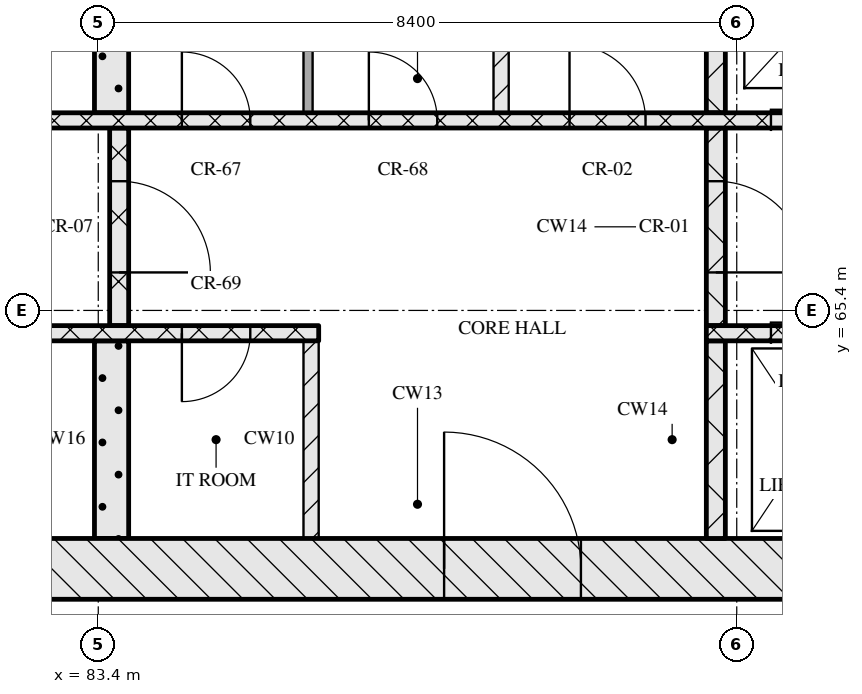
"""IFC4 building model, lengths in metres.
Left out: names, types, materials, properties, quantities, classifications, styles, units other than length and angle.
Written with IfcOpenShell. Run it as: python <this file> out.ifc"""

import sys

from ifc_helpers import new_model, si_unit, direction, frame, frame_2d, origin, place, context, subcontext, project, spatial, rectangle, extrude, element, fill, save


model = new_model("IFC4")
c1 = context("Model", 3, precision=1e-05, world=origin(), true_north=direction((0.0, 1.0)))
c2 = subcontext(c1, "Body", "Model", "MODEL_VIEW")
j1 = project(units=[si_unit("LENGTHUNIT", "METRE"), si_unit("PLANEANGLEUNIT", "RADIAN")], contexts=[c1])
p1 = place(None, origin())
s1 = spatial("IfcSite", under=j1, at=p1, CompositionType="ELEMENT")
p2 = place(p1, origin())
s2 = spatial("IfcBuilding", under=s1, at=p2, CompositionType="ELEMENT")
p3 = place(p2, frame((0.0, 0.0, 151.05)))
s3 = spatial("IfcBuildingStorey", under=s2, at=p3, CompositionType="ELEMENT", Elevation=151.05)
p4 = place(p3, frame((67.0, 62.0, 0.0), z_axis=(0.0, 0.0, 1.0), x_axis=(1.0, 0.0, 0.0)))
e1 = element("IfcWall", 1, at=p4, inside=s3, PredefinedType="SOLIDWALL", context=c2, shape_type="SweptSolid", body=[
    extrude(rectangle(XDim=41.2, YDim=0.8, at=frame_2d((20.6, 0.0))), origin(), (0.0, 0.0, 1.0), 3.32),
])
p5 = place(p4, frame((20.95, 0.0, 0.0)))
e2 = element("IfcOpeningElement", 2, at=p5, cuts=e1, PredefinedType="OPENING", context=c2, shape_type="SweptSolid", body=[
    extrude(rectangle(XDim=1.8, YDim=2.1, at=frame_2d((0.9, 1.05))), frame((0.0, 0.41, 0.0), z_axis=(0.0, -1.0, 0.0), x_axis=(1.0, 0.0, 0.0)), (0.0, 0.0, 1.0), 0.82),
])
p6 = place(p3, frame((83.575, 62.4, 0.0), z_axis=(0.0, 0.0, 1.0), x_axis=(0.0, 1.0, 0.0)))
e3 = element("IfcWall", 3, at=p6, inside=s3, PredefinedType="SOLIDWALL", context=c2, shape_type="SweptSolid", body=[
    extrude(rectangle(XDim=2.6, YDim=0.45, at=frame_2d((1.3, 0.0))), origin(), (0.0, 0.0, 1.0), 3.32),
])
p7 = place(p3, frame((86.2, 62.4, 0.0), z_axis=(0.0, 0.0, 1.0), x_axis=(0.0, 1.0, 0.0)))
e4 = element("IfcWall", 4, at=p7, inside=s3, PredefinedType="PARTITIONING", context=c2, shape_type="SweptSolid", body=[
    extrude(rectangle(XDim=2.6, YDim=0.2, at=frame_2d((1.3, 0.0))), origin(), (0.0, 0.0, 1.0), 3.32),
])
p8 = place(p3, frame((91.525, 62.4, 0.0), z_axis=(0.0, 0.0, 1.0), x_axis=(0.0, 1.0, 0.0)))
e5 = element("IfcWall", 5, at=p8, inside=s3, PredefinedType="SOLIDWALL", context=c2, shape_type="SweptSolid", body=[
    extrude(rectangle(XDim=2.6, YDim=0.25, at=frame_2d((1.3, 0.0))), origin(), (0.0, 0.0, 1.0), 3.32),
])
p9 = place(p3, frame((67.8, 65.1, 0.0), z_axis=(0.0, 0.0, 1.0), x_axis=(1.0, 0.0, 0.0)))
e6 = element("IfcWall", 6, at=p9, inside=s3, PredefinedType="SOLIDWALL", context=c2, shape_type="SweptSolid", body=[
    extrude(rectangle(XDim=18.5, YDim=0.2, at=frame_2d((9.25, 0.0))), origin(), (0.0, 0.0, 1.0), 3.32),
])
p10 = place(p9, frame((7.27, 0.0, 0.0)))
e7 = element("IfcOpeningElement", 7, at=p10, cuts=e6, PredefinedType="OPENING", context=c2, shape_type="SweptSolid", body=[
    extrude(rectangle(XDim=0.9, YDim=2.1, at=frame_2d((0.45, 1.05))), frame((0.0, 0.11, 0.0), z_axis=(0.0, -1.0, 0.0), x_axis=(1.0, 0.0, 0.0)), (0.0, 0.0, 1.0), 0.22),
])
p11 = place(p9, frame((11.45, 0.0, 0.0)))
e8 = element("IfcOpeningElement", 8, at=p11, cuts=e6, PredefinedType="OPENING", context=c2, shape_type="SweptSolid", body=[
    extrude(rectangle(XDim=0.9, YDim=2.1, at=frame_2d((0.45, 1.05))), frame((0.0, 0.11, 0.0), z_axis=(0.0, -1.0, 0.0), x_axis=(1.0, 0.0, 0.0)), (0.0, 0.0, 1.0), 0.22),
])
p12 = place(p9, frame((16.7, 0.0, 0.0)))
e9 = element("IfcOpeningElement", 9, at=p12, cuts=e6, PredefinedType="OPENING", context=c2, shape_type="SweptSolid", body=[
    extrude(rectangle(XDim=0.9, YDim=2.1, at=frame_2d((0.45, 1.05))), frame((0.0, 0.11, 0.0), z_axis=(0.0, -1.0, 0.0), x_axis=(1.0, 0.0, 0.0)), (0.0, 0.0, 1.0), 0.22),
])
p13 = place(p3, frame((91.4, 65.1, 0.0), z_axis=(0.0, 0.0, 1.0), x_axis=(1.0, 0.0, 0.0)))
e10 = element("IfcWall", 10, at=p13, inside=s3, PredefinedType="SOLIDWALL", context=c2, shape_type="SweptSolid", body=[
    extrude(rectangle(XDim=16.0, YDim=0.2, at=frame_2d((8.0, 0.0))), origin(), (0.0, 0.0, 1.0), 3.32),
])
p14 = place(p13, frame((0.85, 0.0, 0.0)))
e11 = element("IfcOpeningElement", 11, at=p14, cuts=e10, PredefinedType="OPENING", context=c2, shape_type="SweptSolid", body=[
    extrude(rectangle(XDim=1.1, YDim=2.1, at=frame_2d((0.55, 1.05))), frame((0.0, 0.11, 0.0), z_axis=(0.0, -1.0, 0.0), x_axis=(1.0, 0.0, 0.0)), (0.0, 0.0, 1.0), 0.22),
])
p15 = place(p13, frame((3.35, 0.0, 0.0)))
e12 = element("IfcOpeningElement", 12, at=p15, cuts=e10, PredefinedType="OPENING", context=c2, shape_type="SweptSolid", body=[
    extrude(rectangle(XDim=1.1, YDim=2.1, at=frame_2d((0.55, 1.05))), frame((0.0, 0.11, 0.0), z_axis=(0.0, -1.0, 0.0), x_axis=(1.0, 0.0, 0.0)), (0.0, 0.0, 1.0), 0.22),
])
p16 = place(p13, frame((5.85, 0.0, 0.0)))
e13 = element("IfcOpeningElement", 13, at=p16, cuts=e10, PredefinedType="OPENING", context=c2, shape_type="SweptSolid", body=[
    extrude(rectangle(XDim=1.1, YDim=2.1, at=frame_2d((0.55, 1.05))), frame((0.0, 0.11, 0.0), z_axis=(0.0, -1.0, 0.0), x_axis=(1.0, 0.0, 0.0)), (0.0, 0.0, 1.0), 0.22),
])
p17 = place(p13, frame((7.83, 0.0, 0.0)))
e14 = element("IfcOpeningElement", 14, at=p17, cuts=e10, PredefinedType="OPENING", context=c2, shape_type="SweptSolid", body=[
    extrude(rectangle(XDim=0.9, YDim=2.1, at=frame_2d((0.45, 1.05))), frame((0.0, 0.11, 0.0), z_axis=(0.0, -1.0, 0.0), x_axis=(1.0, 0.0, 0.0)), (0.0, 0.0, 1.0), 0.22),
])
p18 = place(p3, frame((83.675, 65.2, 0.0), z_axis=(0.0, 0.0, 1.0), x_axis=(0.0, 1.0, 0.0)))
e15 = element("IfcWall", 15, at=p18, inside=s3, PredefinedType="SOLIDWALL", context=c2, shape_type="SweptSolid", body=[
    extrude(rectangle(XDim=2.6, YDim=0.25, at=frame_2d((1.3, 0.0))), origin(), (0.0, 0.0, 1.0), 3.32),
])
p19 = place(p18, frame((0.7, 0.0, 0.0)))
e16 = element("IfcOpeningElement", 16, at=p19, cuts=e15, PredefinedType="OPENING", context=c2, shape_type="SweptSolid", body=[
    extrude(rectangle(XDim=1.2, YDim=2.1, at=frame_2d((0.6, 1.05))), frame((0.0, 0.135, 0.0), z_axis=(0.0, -1.0, 0.0), x_axis=(1.0, 0.0, 0.0)), (0.0, 0.0, 1.0), 0.27),
])
p20 = place(p3, frame((91.525, 65.2, 0.0), z_axis=(0.0, 0.0, 1.0), x_axis=(0.0, 1.0, 0.0)))
e17 = element("IfcWall", 17, at=p20, inside=s3, PredefinedType="SOLIDWALL", context=c2, shape_type="SweptSolid", body=[
    extrude(rectangle(XDim=2.6, YDim=0.25, at=frame_2d((1.3, 0.0))), origin(), (0.0, 0.0, 1.0), 3.32),
])
p21 = place(p20, frame((0.7, 0.0, 0.0)))
e18 = element("IfcOpeningElement", 18, at=p21, cuts=e17, PredefinedType="OPENING", context=c2, shape_type="SweptSolid", body=[
    extrude(rectangle(XDim=1.2, YDim=2.1, at=frame_2d((0.6, 1.05))), frame((0.0, 0.135, 0.0), z_axis=(0.0, -1.0, 0.0), x_axis=(1.0, 0.0, 0.0)), (0.0, 0.0, 1.0), 0.27),
])
p22 = place(p3, frame((76.05, 67.9, 0.0), z_axis=(0.0, 0.0, 1.0), x_axis=(1.0, 0.0, 0.0)))
e19 = element("IfcWall", 19, at=p22, inside=s3, PredefinedType="SOLIDWALL", context=c2, shape_type="SweptSolid", body=[
    extrude(rectangle(XDim=23.1, YDim=0.2, at=frame_2d((11.55, 0.0))), origin(), (0.0, 0.0, 1.0), 3.32),
])
p23 = place(p22, frame((1.4, 0.0, 0.0)))
e20 = element("IfcOpeningElement", 20, at=p23, cuts=e19, PredefinedType="OPENING", context=c2, shape_type="SweptSolid", body=[
    extrude(rectangle(XDim=0.9, YDim=2.1, at=frame_2d((0.45, 1.05))), frame((0.0, 0.11, 0.0), z_axis=(0.0, -1.0, 0.0), x_axis=(1.0, 0.0, 0.0)), (0.0, 0.0, 1.0), 0.22),
])
p24 = place(p22, frame((5.11, 0.0, 0.0)))
e21 = element("IfcOpeningElement", 21, at=p24, cuts=e19, PredefinedType="OPENING", context=c2, shape_type="SweptSolid", body=[
    extrude(rectangle(XDim=0.9, YDim=2.1, at=frame_2d((0.45, 1.05))), frame((0.0, 0.11, 0.0), z_axis=(0.0, -1.0, 0.0), x_axis=(1.0, 0.0, 0.0)), (0.0, 0.0, 1.0), 0.22),
])
p25 = place(p22, frame((8.45, 0.0, 0.0)))
e22 = element("IfcOpeningElement", 22, at=p25, cuts=e19, PredefinedType="OPENING", context=c2, shape_type="SweptSolid", body=[
    extrude(rectangle(XDim=0.9, YDim=2.1, at=frame_2d((0.45, 1.05))), frame((0.0, 0.11, 0.0), z_axis=(0.0, -1.0, 0.0), x_axis=(1.0, 0.0, 0.0)), (0.0, 0.0, 1.0), 0.22),
])
p26 = place(p22, frame((10.91, 0.0, 0.0)))
e23 = element("IfcOpeningElement", 23, at=p26, cuts=e19, PredefinedType="OPENING", context=c2, shape_type="SweptSolid", body=[
    extrude(rectangle(XDim=0.9, YDim=2.1, at=frame_2d((0.45, 1.05))), frame((0.0, 0.11, 0.0), z_axis=(0.0, -1.0, 0.0), x_axis=(1.0, 0.0, 0.0)), (0.0, 0.0, 1.0), 0.22),
])
p27 = place(p22, frame((13.55, 0.0, 0.0)))
e24 = element("IfcOpeningElement", 24, at=p27, cuts=e19, PredefinedType="OPENING", context=c2, shape_type="SweptSolid", body=[
    extrude(rectangle(XDim=1.0, YDim=2.1, at=frame_2d((0.5, 1.05))), frame((0.0, 0.11, 0.0), z_axis=(0.0, -1.0, 0.0), x_axis=(1.0, 0.0, 0.0)), (0.0, 0.0, 1.0), 0.22),
])
p28 = place(p22, frame((16.2, 0.0, 0.0)))
e25 = element("IfcOpeningElement", 25, at=p28, cuts=e19, PredefinedType="OPENING", context=c2, shape_type="SweptSolid", body=[
    extrude(rectangle(XDim=1.1, YDim=2.1, at=frame_2d((0.55, 1.05))), frame((0.0, 0.11, 0.0), z_axis=(0.0, -1.0, 0.0), x_axis=(1.0, 0.0, 0.0)), (0.0, 0.0, 1.0), 0.22),
])
p29 = place(p22, frame((18.7, 0.0, 0.0)))
e26 = element("IfcOpeningElement", 26, at=p29, cuts=e19, PredefinedType="OPENING", context=c2, shape_type="SweptSolid", body=[
    extrude(rectangle(XDim=1.1, YDim=2.1, at=frame_2d((0.55, 1.05))), frame((0.0, 0.11, 0.0), z_axis=(0.0, -1.0, 0.0), x_axis=(1.0, 0.0, 0.0)), (0.0, 0.0, 1.0), 0.22),
])
p30 = place(p22, frame((21.2, 0.0, 0.0)))
e27 = element("IfcOpeningElement", 27, at=p30, cuts=e19, PredefinedType="OPENING", context=c2, shape_type="SweptSolid", body=[
    extrude(rectangle(XDim=1.1, YDim=2.1, at=frame_2d((0.55, 1.05))), frame((0.0, 0.11, 0.0), z_axis=(0.0, -1.0, 0.0), x_axis=(1.0, 0.0, 0.0)), (0.0, 0.0, 1.0), 0.22),
])
p31 = place(p3, frame((83.575, 68.0, 0.0), z_axis=(0.0, 0.0, 1.0), x_axis=(0.0, 1.0, 0.0)))
e28 = element("IfcWall", 28, at=p31, inside=s3, PredefinedType="SOLIDWALL", context=c2, shape_type="SweptSolid", body=[
    extrude(rectangle(XDim=2.6, YDim=0.45, at=frame_2d((1.3, 0.0))), origin(), (0.0, 0.0, 1.0), 3.32),
])
p32 = place(p3, frame((86.16, 68.0, 0.0), z_axis=(0.0, 0.0, 1.0), x_axis=(0.0, 1.0, 0.0)))
e29 = element("IfcWall", 29, at=p32, inside=s3, PredefinedType="PARTITIONING", context=c2, shape_type="SweptSolid", body=[
    extrude(rectangle(XDim=2.6, YDim=0.12, at=frame_2d((1.3, 0.0))), origin(), (0.0, 0.0, 1.0), 3.32),
])
p33 = place(p3, frame((88.7, 68.0, 0.0), z_axis=(0.0, 0.0, 1.0), x_axis=(0.0, 1.0, 0.0)))
e30 = element("IfcWall", 30, at=p33, inside=s3, PredefinedType="PARTITIONING", context=c2, shape_type="SweptSolid", body=[
    extrude(rectangle(XDim=2.6, YDim=0.2, at=frame_2d((1.3, 0.0))), origin(), (0.0, 0.0, 1.0), 3.32),
])
p34 = place(p3, frame((91.525, 68.0, 0.0), z_axis=(0.0, 0.0, 1.0), x_axis=(0.0, 1.0, 0.0)))
e31 = element("IfcWall", 31, at=p34, inside=s3, PredefinedType="SOLIDWALL", context=c2, shape_type="SweptSolid", body=[
    extrude(rectangle(XDim=2.6, YDim=0.25, at=frame_2d((1.3, 0.0))), origin(), (0.0, 0.0, 1.0), 3.32),
])
p35 = place(p5, origin())
e32 = element("IfcDoor", 32, at=p35, inside=s3, OperationType="DOUBLE_DOOR_SINGLE_SWING", PredefinedType="DOOR", context=c2, shape_type="SweptSolid", body=[
    extrude(rectangle(XDim=1.8, YDim=2.1, at=frame_2d((0.9, 1.05))), frame((0.0, 0.025, 0.0), z_axis=(0.0, -1.0, 0.0), x_axis=(1.0, 0.0, 0.0)), (0.0, 0.0, 1.0), 0.05),
])
fill(e2, e32)
p36 = place(p12, origin())
e33 = element("IfcDoor", 33, at=p36, inside=s3, OperationType="SINGLE_SWING_RIGHT", PredefinedType="DOOR", context=c2, shape_type="SweptSolid", body=[
    extrude(rectangle(XDim=0.9, YDim=2.1, at=frame_2d((0.45, 1.05))), frame((0.0, 0.025, 0.0), z_axis=(0.0, -1.0, 0.0), x_axis=(1.0, 0.0, 0.0)), (0.0, 0.0, 1.0), 0.05),
])
fill(e9, e33)
p37 = place(p14, origin())
e34 = element("IfcDoor", 34, at=p37, inside=s3, OperationType="SLIDING_TO_LEFT", PredefinedType="DOOR", context=c2, shape_type="SweptSolid", body=[
    extrude(rectangle(XDim=1.1, YDim=2.1, at=frame_2d((0.55, 1.05))), frame((0.0, 0.025, 0.0), z_axis=(0.0, -1.0, 0.0), x_axis=(1.0, 0.0, 0.0)), (0.0, 0.0, 1.0), 0.05),
])
fill(e11, e34)
p38 = place(p19, origin())
e35 = element("IfcDoor", 35, at=p38, inside=s3, OperationType="SINGLE_SWING_RIGHT", PredefinedType="DOOR", context=c2, shape_type="SweptSolid", body=[
    extrude(rectangle(XDim=1.2, YDim=2.1, at=frame_2d((0.6, 1.05))), frame((0.0, 0.025, 0.0), z_axis=(0.0, -1.0, 0.0), x_axis=(1.0, 0.0, 0.0)), (0.0, 0.0, 1.0), 0.05),
])
fill(e16, e35)
p39 = place(p21, origin())
e36 = element("IfcDoor", 36, at=p39, inside=s3, OperationType="SINGLE_SWING_RIGHT", PredefinedType="DOOR", context=c2, shape_type="SweptSolid", body=[
    extrude(rectangle(XDim=1.2, YDim=2.1, at=frame_2d((0.6, 1.05))), frame((0.0, 0.025, 0.0), z_axis=(0.0, -1.0, 0.0), x_axis=(1.0, 0.0, 0.0)), (0.0, 0.0, 1.0), 0.05),
])
fill(e18, e36)
p40 = place(p25, origin())
e37 = element("IfcDoor", 37, at=p40, inside=s3, OperationType="SINGLE_SWING_LEFT", PredefinedType="DOOR", context=c2, shape_type="SweptSolid", body=[
    extrude(rectangle(XDim=0.9, YDim=2.1, at=frame_2d((0.45, 1.05))), frame((0.0, 0.025, 0.0), z_axis=(0.0, -1.0, 0.0), x_axis=(1.0, 0.0, 0.0)), (0.0, 0.0, 1.0), 0.05),
])
fill(e22, e37)
p41 = place(p26, origin())
e38 = element("IfcDoor", 38, at=p41, inside=s3, OperationType="SINGLE_SWING_LEFT", PredefinedType="DOOR", context=c2, shape_type="SweptSolid", body=[
    extrude(rectangle(XDim=0.9, YDim=2.1, at=frame_2d((0.45, 1.05))), frame((0.0, 0.025, 0.0), z_axis=(0.0, -1.0, 0.0), x_axis=(1.0, 0.0, 0.0)), (0.0, 0.0, 1.0), 0.05),
])
fill(e23, e38)
p42 = place(p27, origin())
e39 = element("IfcDoor", 39, at=p42, inside=s3, OperationType="SINGLE_SWING_LEFT", PredefinedType="DOOR", context=c2, shape_type="SweptSolid", body=[
    extrude(rectangle(XDim=1.0, YDim=2.1, at=frame_2d((0.5, 1.05))), frame((0.0, 0.025, 0.0), z_axis=(0.0, -1.0, 0.0), x_axis=(1.0, 0.0, 0.0)), (0.0, 0.0, 1.0), 0.05),
])
fill(e24, e39)
p43 = place(p28, origin())
e40 = element("IfcDoor", 40, at=p43, inside=s3, OperationType="SLIDING_TO_RIGHT", PredefinedType="DOOR", context=c2, shape_type="SweptSolid", body=[
    extrude(rectangle(XDim=1.1, YDim=2.1, at=frame_2d((0.55, 1.05))), frame((0.0, 0.025, 0.0), z_axis=(0.0, -1.0, 0.0), x_axis=(1.0, 0.0, 0.0)), (0.0, 0.0, 1.0), 0.05),
])
fill(e25, e40)
save(model, sys.argv[1])
